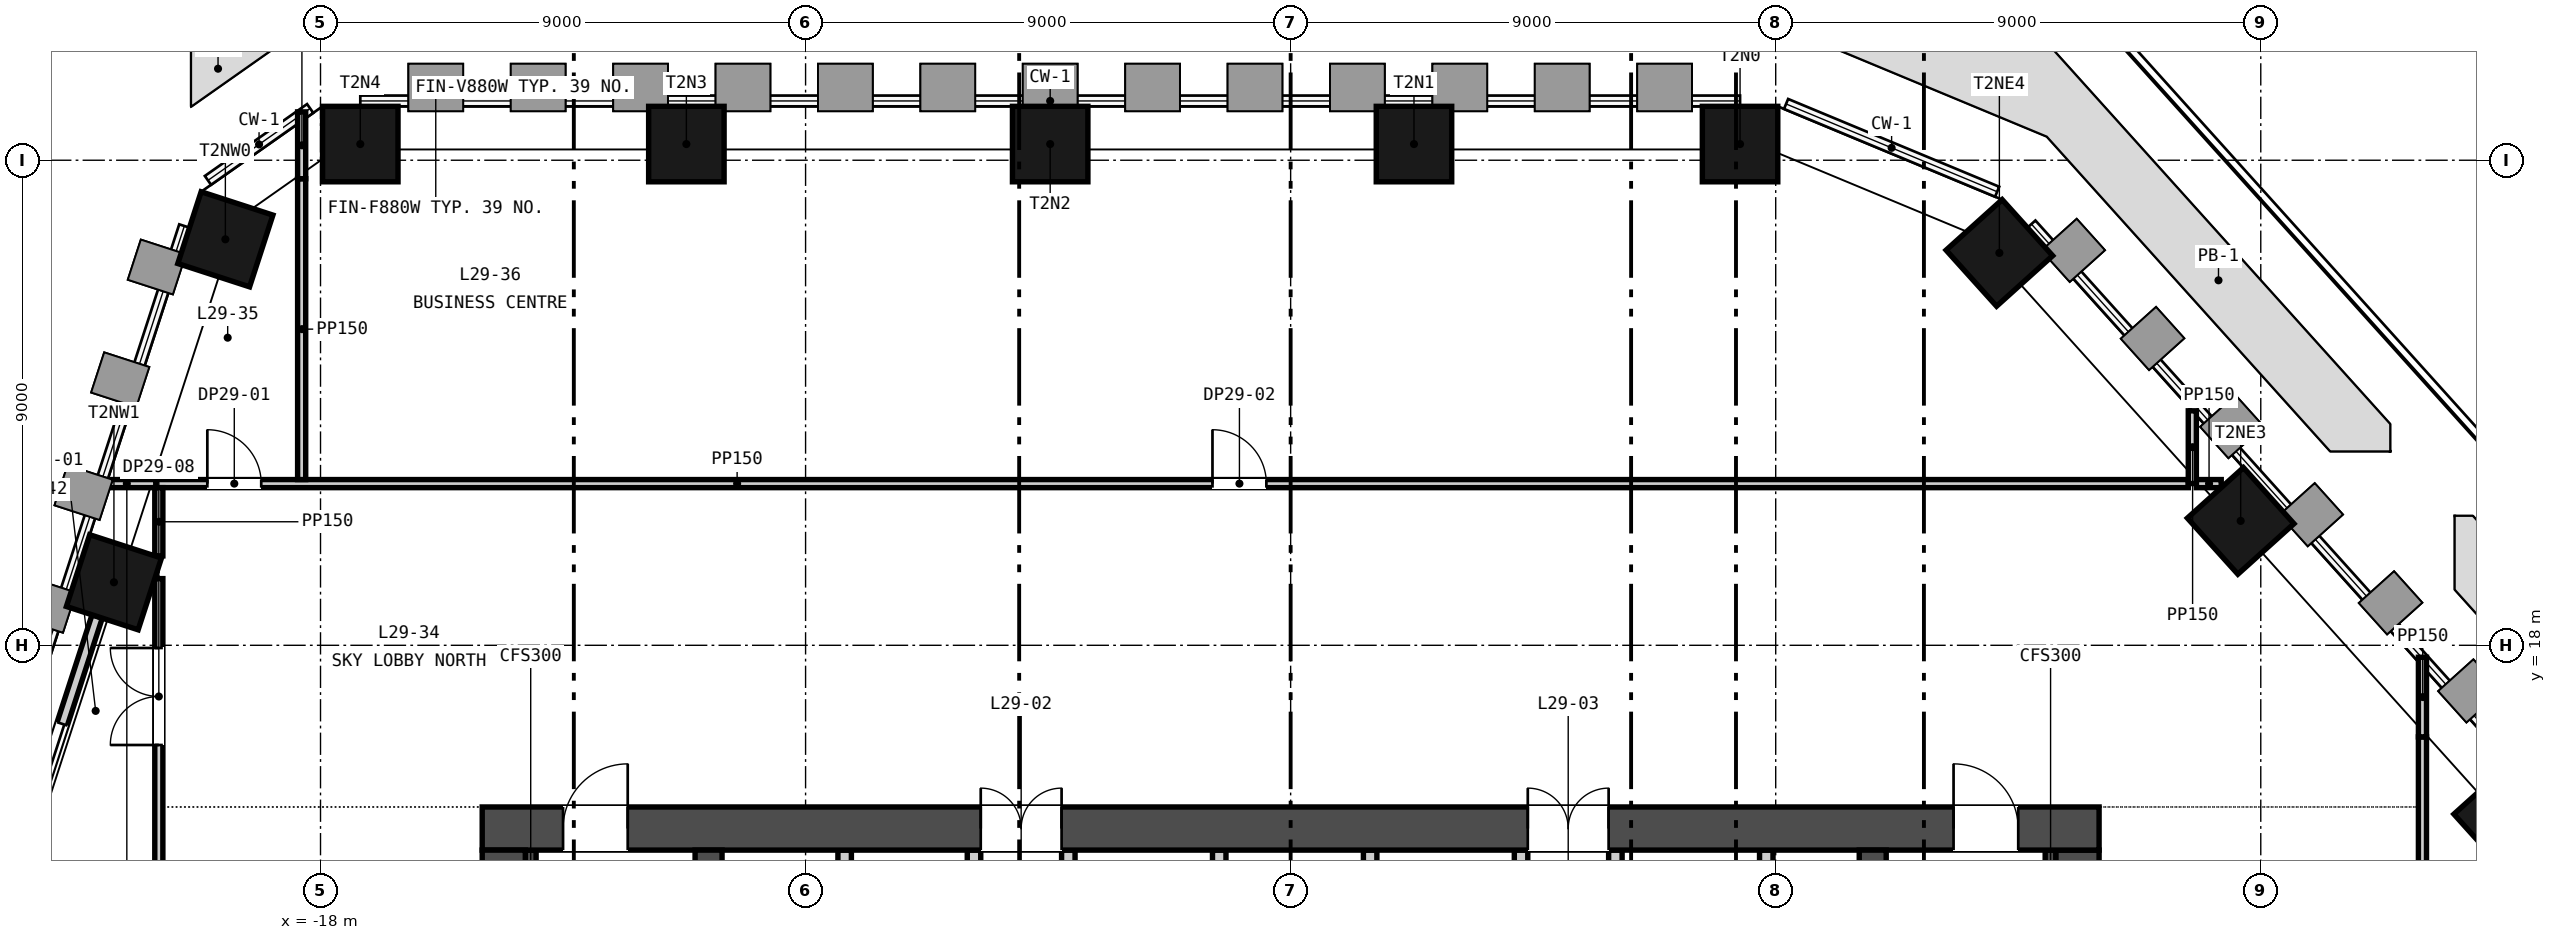
"""IFC4 building model, lengths in metres.
Left out: names, types, materials, properties, quantities, classifications, styles, units other than length and angle.
Written with IfcOpenShell. Run it as: python <this file> out.ifc"""

import sys

from ifc_helpers import new_model, si_unit, direction, frame, frame_2d, origin, origin_2d, place, context, subcontext, project, spatial, rectangle, extrude, element, fill, save


model = new_model("IFC4")
c1 = context("Model", 3, precision=1e-05, world=origin(), true_north=direction((0.0, 1.0)))
c2 = subcontext(c1, "Body", "Model", "MODEL_VIEW")
j1 = project(units=[si_unit("LENGTHUNIT", "METRE"), si_unit("PLANEANGLEUNIT", "RADIAN")], contexts=[c1])
p1 = place(None, origin())
s1 = spatial("IfcSite", under=j1, at=p1, CompositionType="ELEMENT")
p2 = place(p1, origin())
s2 = spatial("IfcBuilding", under=s1, at=p2, CompositionType="ELEMENT")
p3 = place(p2, frame((0.0, 0.0, 121.65)))
s3 = spatial("IfcBuildingStorey", under=s2, at=p3, CompositionType="ELEMENT", Elevation=121.65)
p4 = place(p3, frame((-15.0, 14.6, -0.3), z_axis=(0.0, 0.0, 1.0), x_axis=(1.0, 0.0, 0.0)))
e1 = element("IfcWall", 1, at=p4, inside=s3, PredefinedType="SOLIDWALL", context=c2, shape_type="SweptSolid", body=[
    extrude(rectangle(XDim=30.0, YDim=0.8, at=frame_2d((15.0, 0.0))), origin(), (0.0, 0.0, 1.0), 4.65),
])
p5 = place(p4, frame((9.25, 0.0, 0.3)))
e2 = element("IfcOpeningElement", 2, at=p5, cuts=e1, PredefinedType="OPENING", context=c2, shape_type="SweptSolid", body=[
    extrude(rectangle(XDim=1.5, YDim=2.1, at=frame_2d((0.75, 1.05))), frame((0.0, 0.41, 0.0), z_axis=(0.0, -1.0, 0.0), x_axis=(1.0, 0.0, 0.0)), (0.0, 0.0, 1.0), 0.82),
])
p6 = place(p4, frame((19.4, 0.0, 0.3)))
e3 = element("IfcOpeningElement", 3, at=p6, cuts=e1, PredefinedType="OPENING", context=c2, shape_type="SweptSolid", body=[
    extrude(rectangle(XDim=1.5, YDim=2.1, at=frame_2d((0.75, 1.05))), frame((0.0, 0.41, 0.0), z_axis=(0.0, -1.0, 0.0), x_axis=(1.0, 0.0, 0.0)), (0.0, 0.0, 1.0), 0.82),
])
p7 = place(p4, frame((1.5, 0.0, 0.3)))
e4 = element("IfcOpeningElement", 4, at=p7, cuts=e1, PredefinedType="OPENING", context=c2, shape_type="SweptSolid", body=[
    extrude(rectangle(XDim=1.2, YDim=2.1, at=frame_2d((0.6, 1.05))), frame((0.0, 0.41, 0.0), z_axis=(0.0, -1.0, 0.0), x_axis=(1.0, 0.0, 0.0)), (0.0, 0.0, 1.0), 0.82),
])
p8 = place(p4, frame((27.3, 0.0, 0.3)))
e5 = element("IfcOpeningElement", 5, at=p8, cuts=e1, PredefinedType="OPENING", context=c2, shape_type="SweptSolid", body=[
    extrude(rectangle(XDim=1.2, YDim=2.1, at=frame_2d((0.6, 1.05))), frame((0.0, 0.41, 0.0), z_axis=(0.0, -1.0, 0.0), x_axis=(1.0, 0.0, 0.0)), (0.0, 0.0, 1.0), 0.82),
])
for number, where, z_axis, x_axis in (
    (6, (-14.6, 0.8, -0.3), (0.0, 0.0, 1.0), (0.0, 1.0, 0.0)),
    (7, (14.6, 0.8, -0.3), (0.0, 0.0, 1.0), (0.0, 1.0, 0.0)),
):
    element("IfcWall", number, at=place(p3, frame(where, z_axis=z_axis, x_axis=x_axis)), inside=s3, PredefinedType="SOLIDWALL", context=c2, shape_type="SweptSolid", body=[
        extrude(rectangle(XDim=13.4, YDim=0.8, at=frame_2d((6.7, 0.0))), origin(), (0.0, 0.0, 1.0), 4.65),
    ])
for number, where, z_axis, x_axis in (
    (8, (-10.8, 0.8, -0.3), (0.0, 0.0, 1.0), (0.0, 1.0, 0.0)),
    (9, (10.8, 0.8, -0.3), (0.0, 0.0, 1.0), (0.0, 1.0, 0.0)),
):
    element("IfcWall", number, at=place(p3, frame(where, z_axis=z_axis, x_axis=x_axis)), inside=s3, PredefinedType="SOLIDWALL", context=c2, shape_type="SweptSolid", body=[
        extrude(rectangle(XDim=13.4, YDim=0.5, at=frame_2d((6.7, 0.0))), origin(), (0.0, 0.0, 1.0), 4.65),
    ])
for number, where, z_axis, x_axis in (
    (10, (8.339, 27.3, -0.3), (0.0, 0.0, 1.0), (-1.0, 0.0, 0.0)),
    (11, (2.288, 27.3, -0.3), (0.0, 0.0, 1.0), (-1.0, 0.0, 0.0)),
    (12, (-4.462, 27.3, -0.3), (0.0, 0.0, 1.0), (-1.0, 0.0, 0.0)),
    (13, (-11.212, 27.3, -0.3), (0.0, 0.0, 1.0), (-1.0, 0.0, 0.0)),
    (14, (-17.262, 27.3, -0.3), (0.0, 0.0, 1.0), (-1.0, 0.0, 0.0)),
    (15, (-19.765, 25.533, -0.3), (0.0, 0.0, 1.0), (-0.309, -0.951, 0.0)),
    (16, (-21.833, 19.17, -0.3), (0.0, 0.0, 1.0), (-0.309, -0.951, 0.0)),
    (17, (22.573, 14.816, -0.3), (0.0, 0.0, 1.0), (-0.669, 0.743, 0.0)),
    (18, (17.627, 20.308, -0.3), (0.0, 0.0, 1.0), (-0.669, 0.743, 0.0)),
    (19, (13.15, 25.28, -0.3), (0.0, 0.0, 1.0), (-0.669, 0.743, 0.0)),
):
    element("IfcColumn", number, at=place(p3, frame(where, z_axis=z_axis, x_axis=x_axis)), inside=s3, PredefinedType="COLUMN", context=c2, shape_type="SweptSolid", body=[
        extrude(rectangle(XDim=1.4, YDim=1.4, at=origin_2d()), origin(), (0.0, 0.0, 1.0), 4.65),
    ])
p9 = place(p3, frame((-22.144, 18.535, 0.0), z_axis=(0.0, 0.0, 1.0), x_axis=(-0.309029860788, -0.951052335648, 0.0)))
e20 = element("IfcWall", 20, at=p9, inside=s3, PredefinedType="SOLIDWALL", context=c2, shape_type="SweptSolid", body=[
    extrude(rectangle(XDim=5.991, YDim=0.2, at=frame_2d((2.995, 0.0))), origin(), (0.0, 0.0, 1.0), 3.6),
])
p10 = place(p9, frame((2.095, 0.0, 0.0)))
e21 = element("IfcOpeningElement", 21, at=p10, cuts=e20, PredefinedType="OPENING", context=c2, shape_type="SweptSolid", body=[
    extrude(rectangle(XDim=1.8, YDim=2.4, at=frame_2d((0.9, 1.2))), frame((0.0, 0.11, 0.0), z_axis=(0.0, -1.0, 0.0), x_axis=(1.0, 0.0, 0.0)), (0.0, 0.0, 1.0), 0.22),
])
for number, where, z_axis, x_axis in (
    (22, (-8.275, 11.3, 0.0), (0.0, 0.0, 1.0), (0.0, 1.0, 0.0)),
    (23, (-5.875, 11.3, 0.0), (0.0, 0.0, 1.0), (0.0, 1.0, 0.0)),
    (24, (-4.125, 11.3, 0.0), (0.0, 0.0, 1.0), (0.0, 1.0, 0.0)),
    (25, (-1.325, 11.3, 0.0), (0.0, 0.0, 1.0), (0.0, 1.0, 0.0)),
    (26, (1.475, 11.3, 0.0), (0.0, 0.0, 1.0), (0.0, 1.0, 0.0)),
    (27, (4.275, 11.3, 0.0), (0.0, 0.0, 1.0), (0.0, 1.0, 0.0)),
    (28, (6.025, 11.3, 0.0), (0.0, 0.0, 1.0), (0.0, 1.0, 0.0)),
    (29, (8.825, 11.3, 0.0), (0.0, 0.0, 1.0), (0.0, 1.0, 0.0)),
):
    element("IfcWall", number, at=place(p3, frame(where, z_axis=z_axis, x_axis=x_axis)), inside=s3, PredefinedType="PARTITIONING", context=c2, shape_type="SweptSolid", body=[
        extrude(rectangle(XDim=2.9, YDim=0.25, at=frame_2d((1.45, 0.0))), origin(), (0.0, 0.0, 1.0), 4.35),
    ])
for number, where, z_axis, x_axis in (
    (30, (-14.1, 0.8, 0.0), (0.0, 0.0, 1.0), (0.0, 1.0, 0.0)),
    (31, (14.1, 0.8, 0.0), (0.0, 0.0, 1.0), (0.0, 1.0, 0.0)),
):
    element("IfcWall", number, at=place(p3, frame(where, z_axis=z_axis, x_axis=x_axis)), inside=s3, PredefinedType="SOLIDWALL", context=c2, shape_type="SweptSolid", body=[
        extrude(rectangle(XDim=13.4, YDim=0.2, at=frame_2d((6.7, 0.0))), origin(), (0.0, 0.0, 1.0), 4.35),
    ])
p11 = place(p3, frame((-22.144, 21.0, 0.0), z_axis=(0.0, 0.0, 1.0), x_axis=(1.0, 0.0, 0.0)))
e32 = element("IfcWall", 32, at=p11, inside=s3, PredefinedType="PARTITIONING", context=c2, shape_type="SweptSolid", body=[
    extrude(rectangle(XDim=1.091, YDim=0.15, at=frame_2d((0.546, 0.0))), origin(), (0.0, 0.0, 1.0), 3.6),
])
p12 = place(p3, frame((-21.053, 21.0, 0.0), z_axis=(0.0, 0.0, 1.0), x_axis=(1.0, 0.0, 0.0)))
e33 = element("IfcWall", 33, at=p12, inside=s3, PredefinedType="PARTITIONING", context=c2, shape_type="SweptSolid", body=[
    extrude(rectangle(XDim=37.708, YDim=0.15, at=frame_2d((18.854, 0.0))), origin(), (0.0, 0.0, 1.0), 4.35),
])
p13 = place(p12, frame((0.953, 0.0, 0.0)))
e34 = element("IfcOpeningElement", 34, at=p13, cuts=e33, PredefinedType="OPENING", context=c2, shape_type="SweptSolid", body=[
    extrude(rectangle(XDim=1.0, YDim=2.1, at=frame_2d((0.5, 1.05))), frame((0.0, 0.085, 0.0), z_axis=(0.0, -1.0, 0.0), x_axis=(1.0, 0.0, 0.0)), (0.0, 0.0, 1.0), 0.17),
])
p14 = place(p12, frame((19.603, 0.0, 0.0)))
e35 = element("IfcOpeningElement", 35, at=p14, cuts=e33, PredefinedType="OPENING", context=c2, shape_type="SweptSolid", body=[
    extrude(rectangle(XDim=1.0, YDim=2.1, at=frame_2d((0.5, 1.05))), frame((0.0, 0.085, 0.0), z_axis=(0.0, -1.0, 0.0), x_axis=(1.0, 0.0, 0.0)), (0.0, 0.0, 1.0), 0.17),
])
p15 = place(p3, frame((16.805, 21.0, 0.0), z_axis=(0.0, 0.0, 1.0), x_axis=(1.0, 0.0, 0.0)))
e36 = element("IfcWall", 36, at=p15, inside=s3, PredefinedType="PARTITIONING", context=c2, shape_type="SweptSolid", body=[
    extrude(rectangle(XDim=0.461, YDim=0.15, at=frame_2d((0.23, 0.0))), origin(), (0.0, 0.0, 1.0), 4.35),
])
p16 = place(p3, frame((-21.0, 0.343, 0.0), z_axis=(0.0, 0.0, 1.0), x_axis=(0.0, 1.0, 0.0)))
e37 = element("IfcWall", 37, at=p16, inside=s3, PredefinedType="PARTITIONING", context=c2, shape_type="SweptSolid", body=[
    extrude(rectangle(XDim=18.894, YDim=0.15, at=frame_2d((9.447, 0.0))), origin(), (0.0, 0.0, 1.0), 4.35),
])
p17 = place(p16, frame((0.65, 0.0, 0.0)))
e38 = element("IfcOpeningElement", 38, at=p17, cuts=e37, PredefinedType="OPENING", context=c2, shape_type="SweptSolid", body=[
    extrude(rectangle(XDim=1.0, YDim=2.1, at=frame_2d((0.5, 1.05))), frame((0.0, 0.085, 0.0), z_axis=(0.0, -1.0, 0.0), x_axis=(1.0, 0.0, 0.0)), (0.0, 0.0, 1.0), 0.17),
])
p18 = place(p16, frame((2.857, 0.0, 0.0)))
e39 = element("IfcOpeningElement", 39, at=p18, cuts=e37, PredefinedType="OPENING", context=c2, shape_type="SweptSolid", body=[
    extrude(rectangle(XDim=1.0, YDim=2.1, at=frame_2d((0.5, 1.05))), frame((0.0, 0.085, 0.0), z_axis=(0.0, -1.0, 0.0), x_axis=(1.0, 0.0, 0.0)), (0.0, 0.0, 1.0), 0.17),
])
p19 = place(p16, frame((7.407, 0.0, 0.0)))
e40 = element("IfcOpeningElement", 40, at=p19, cuts=e37, PredefinedType="OPENING", context=c2, shape_type="SweptSolid", body=[
    extrude(rectangle(XDim=1.8, YDim=2.4, at=frame_2d((0.9, 1.2))), frame((0.0, 0.085, 0.0), z_axis=(0.0, -1.0, 0.0), x_axis=(1.0, 0.0, 0.0)), (0.0, 0.0, 1.0), 0.17),
])
p20 = place(p16, frame((15.807, 0.0, 0.0)))
e41 = element("IfcOpeningElement", 41, at=p20, cuts=e37, PredefinedType="OPENING", context=c2, shape_type="SweptSolid", body=[
    extrude(rectangle(XDim=1.8, YDim=2.4, at=frame_2d((0.9, 1.2))), frame((0.0, 0.085, 0.0), z_axis=(0.0, -1.0, 0.0), x_axis=(1.0, 0.0, 0.0)), (0.0, 0.0, 1.0), 0.17),
])
p21 = place(p3, frame((-21.0, 19.659, 0.0), z_axis=(0.0, 0.0, 1.0), x_axis=(0.0, 1.0, 0.0)))
e42 = element("IfcWall", 42, at=p21, inside=s3, PredefinedType="PARTITIONING", context=c2, shape_type="SweptSolid", body=[
    extrude(rectangle(XDim=1.266, YDim=0.15, at=frame_2d((0.633, 0.0))), origin(), (0.0, 0.0, 1.0), 4.35),
])
p22 = place(p3, frame((-18.35, 21.075, 0.0), z_axis=(0.0, 0.0, 1.0), x_axis=(0.0, 1.0, 0.0)))
e43 = element("IfcWall", 43, at=p22, inside=s3, PredefinedType="PARTITIONING", context=c2, shape_type="SweptSolid", body=[
    extrude(rectangle(XDim=5.582, YDim=0.15, at=frame_2d((2.791, 0.0))), origin(), (0.0, 0.0, 1.0), 4.35),
])
p23 = place(p3, frame((-18.35, 26.657, 0.0), z_axis=(0.0, 0.0, 1.0), x_axis=(0.0, 1.0, 0.0)))
e44 = element("IfcWall", 44, at=p23, inside=s3, PredefinedType="PARTITIONING", context=c2, shape_type="SweptSolid", body=[
    extrude(rectangle(XDim=1.24, YDim=0.15, at=frame_2d((0.62, 0.0))), origin(), (0.0, 0.0, 1.0), 3.6),
])
p24 = place(p3, frame((16.73, 21.001, 0.0), z_axis=(0.0, 0.0, 1.0), x_axis=(0.0, 1.0, 0.0)))
e45 = element("IfcWall", 45, at=p24, inside=s3, PredefinedType="PARTITIONING", context=c2, shape_type="SweptSolid", body=[
    extrude(rectangle(XDim=1.349, YDim=0.15, at=frame_2d((0.675, 0.0))), origin(), (0.0, 0.0, 1.0), 3.6),
])
p25 = place(p3, frame((21.0, -5.925, 0.0), z_axis=(0.0, 0.0, 1.0), x_axis=(0.0, 1.0, 0.0)))
e46 = element("IfcWall", 46, at=p25, inside=s3, PredefinedType="PARTITIONING", context=c2, shape_type="SweptSolid", body=[
    extrude(rectangle(XDim=22.225, YDim=0.15, at=frame_2d((11.113, 0.0))), origin(), (0.0, 0.0, 1.0), 4.35),
])
p26 = place(p25, frame((9.075, 0.0, 0.0)))
e47 = element("IfcOpeningElement", 47, at=p26, cuts=e46, PredefinedType="OPENING", context=c2, shape_type="SweptSolid", body=[
    extrude(rectangle(XDim=1.8, YDim=2.4, at=frame_2d((0.9, 1.2))), frame((0.0, 0.085, 0.0), z_axis=(0.0, -1.0, 0.0), x_axis=(1.0, 0.0, 0.0)), (0.0, 0.0, 1.0), 0.17),
])
p27 = place(p25, frame((16.575, 0.0, 0.0)))
e48 = element("IfcOpeningElement", 48, at=p27, cuts=e46, PredefinedType="OPENING", context=c2, shape_type="SweptSolid", body=[
    extrude(rectangle(XDim=1.8, YDim=2.4, at=frame_2d((0.9, 1.2))), frame((0.0, 0.085, 0.0), z_axis=(0.0, -1.0, 0.0), x_axis=(1.0, 0.0, 0.0)), (0.0, 0.0, 1.0), 0.17),
])
p28 = place(p3, frame((21.0, 16.3, 0.0), z_axis=(0.0, 0.0, 1.0), x_axis=(0.0, 1.0, 0.0)))
e49 = element("IfcWall", 49, at=p28, inside=s3, PredefinedType="PARTITIONING", context=c2, shape_type="SweptSolid", body=[
    extrude(rectangle(XDim=1.478, YDim=0.15, at=frame_2d((0.739, 0.0))), origin(), (0.0, 0.0, 1.0), 3.6),
])
p29 = place(p10, origin())
e50 = element("IfcDoor", 50, at=p29, inside=s3, OperationType="SINGLE_SWING_LEFT", PredefinedType="DOOR", context=c2, shape_type="SweptSolid", body=[
    extrude(rectangle(XDim=1.8, YDim=2.4, at=frame_2d((0.9, 1.2))), frame((0.0, 0.025, 0.0), z_axis=(0.0, -1.0, 0.0), x_axis=(1.0, 0.0, 0.0)), (0.0, 0.0, 1.0), 0.05),
])
fill(e21, e50)
p30 = place(p5, origin())
e51 = element("IfcDoor", 51, at=p30, inside=s3, OperationType="DOUBLE_DOOR_SINGLE_SWING", PredefinedType="DOOR", context=c2, shape_type="SweptSolid", body=[
    extrude(rectangle(XDim=1.5, YDim=2.1, at=frame_2d((0.75, 1.05))), frame((0.0, 0.025, 0.0), z_axis=(0.0, -1.0, 0.0), x_axis=(1.0, 0.0, 0.0)), (0.0, 0.0, 1.0), 0.05),
])
fill(e2, e51)
p31 = place(p6, origin())
e52 = element("IfcDoor", 52, at=p31, inside=s3, OperationType="DOUBLE_DOOR_SINGLE_SWING", PredefinedType="DOOR", context=c2, shape_type="SweptSolid", body=[
    extrude(rectangle(XDim=1.5, YDim=2.1, at=frame_2d((0.75, 1.05))), frame((0.0, 0.025, 0.0), z_axis=(0.0, -1.0, 0.0), x_axis=(1.0, 0.0, 0.0)), (0.0, 0.0, 1.0), 0.05),
])
fill(e3, e52)
p32 = place(p7, origin())
e53 = element("IfcDoor", 53, at=p32, inside=s3, OperationType="SINGLE_SWING_RIGHT", PredefinedType="DOOR", context=c2, shape_type="SweptSolid", body=[
    extrude(rectangle(XDim=1.2, YDim=2.1, at=frame_2d((0.6, 1.05))), frame((0.0, 0.025, 0.0), z_axis=(0.0, -1.0, 0.0), x_axis=(1.0, 0.0, 0.0)), (0.0, 0.0, 1.0), 0.05),
])
fill(e4, e53)
p33 = place(p8, origin())
e54 = element("IfcDoor", 54, at=p33, inside=s3, OperationType="SINGLE_SWING_LEFT", PredefinedType="DOOR", context=c2, shape_type="SweptSolid", body=[
    extrude(rectangle(XDim=1.2, YDim=2.1, at=frame_2d((0.6, 1.05))), frame((0.0, 0.025, 0.0), z_axis=(0.0, -1.0, 0.0), x_axis=(1.0, 0.0, 0.0)), (0.0, 0.0, 1.0), 0.05),
])
fill(e5, e54)
p34 = place(p13, origin())
e55 = element("IfcDoor", 55, at=p34, inside=s3, OperationType="SINGLE_SWING_LEFT", PredefinedType="DOOR", context=c2, shape_type="SweptSolid", body=[
    extrude(rectangle(XDim=1.0, YDim=2.1, at=frame_2d((0.5, 1.05))), frame((0.0, 0.025, 0.0), z_axis=(0.0, -1.0, 0.0), x_axis=(1.0, 0.0, 0.0)), (0.0, 0.0, 1.0), 0.05),
])
fill(e34, e55)
p35 = place(p14, origin())
e56 = element("IfcDoor", 56, at=p35, inside=s3, OperationType="SINGLE_SWING_LEFT", PredefinedType="DOOR", context=c2, shape_type="SweptSolid", body=[
    extrude(rectangle(XDim=1.0, YDim=2.1, at=frame_2d((0.5, 1.05))), frame((0.0, 0.025, 0.0), z_axis=(0.0, -1.0, 0.0), x_axis=(1.0, 0.0, 0.0)), (0.0, 0.0, 1.0), 0.05),
])
fill(e35, e56)
p36 = place(p20, origin())
e57 = element("IfcDoor", 57, at=p36, inside=s3, OperationType="SINGLE_SWING_LEFT", PredefinedType="DOOR", context=c2, shape_type="SweptSolid", body=[
    extrude(rectangle(XDim=1.8, YDim=2.4, at=frame_2d((0.9, 1.2))), frame((0.0, 0.025, 0.0), z_axis=(0.0, -1.0, 0.0), x_axis=(1.0, 0.0, 0.0)), (0.0, 0.0, 1.0), 0.05),
])
fill(e41, e57)
save(model, sys.argv[1])
